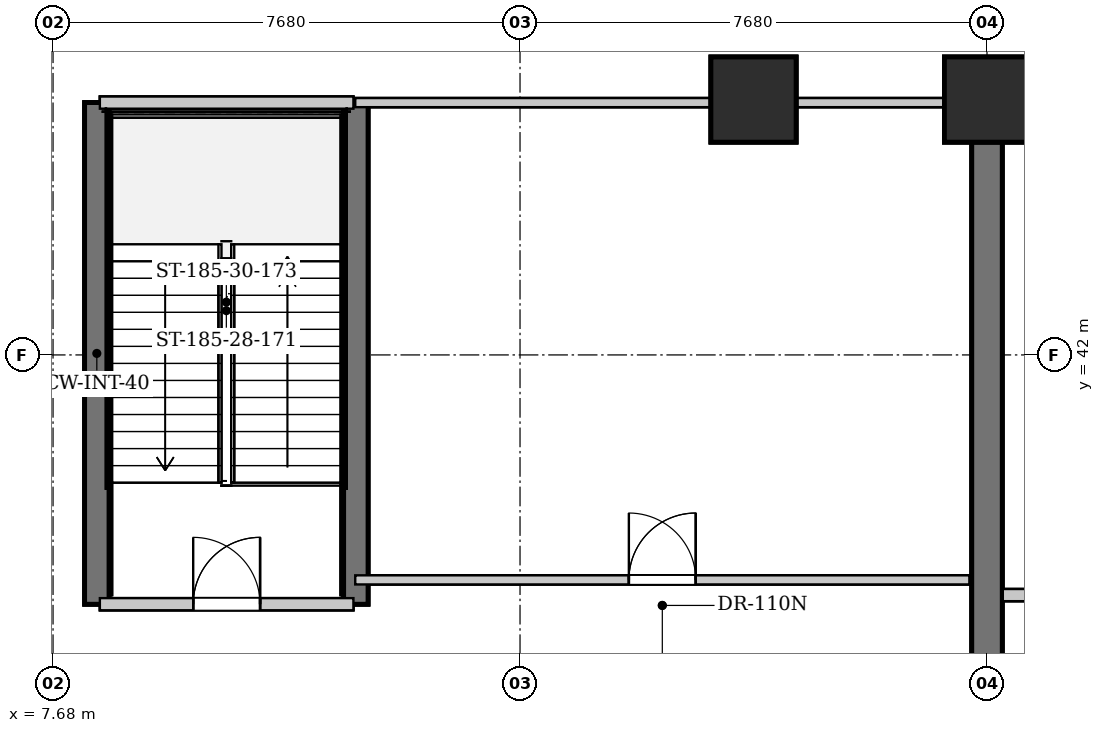
"""IFC4 building model, lengths in metres.
Left out: names, types, materials, properties, quantities, classifications, styles, units other than length and angle.
Written with IfcOpenShell. Run it as: python <this file> out.ifc"""

import sys

from ifc_helpers import new_model, si_unit, direction, frame, frame_2d, origin, origin_2d, place, context, subcontext, project, spatial, rectangle, extrude, element, fill, save


model = new_model("IFC4")
c1 = context("Model", 3, precision=1e-05, world=origin(), true_north=direction((0.0, 1.0)))
c2 = subcontext(c1, "Body", "Model", "MODEL_VIEW")
j1 = project(units=[si_unit("LENGTHUNIT", "METRE"), si_unit("PLANEANGLEUNIT", "RADIAN")], contexts=[c1])
p1 = place(None, origin())
s1 = spatial("IfcSite", under=j1, at=p1, CompositionType="ELEMENT")
p2 = place(p1, origin())
s2 = spatial("IfcBuilding", under=s1, at=p2, CompositionType="ELEMENT")
p3 = place(p2, frame((0.0, 0.0, 10.4)))
s3 = spatial("IfcBuildingStorey", under=s2, at=p3, CompositionType="ELEMENT", Elevation=10.4)
p4 = place(p3, frame((22.79, 46.2, 0.0), z_axis=(0.0, 0.0, 1.0), x_axis=(1.0, 0.0, 0.0)))
e1 = element("IfcWall", 1, at=p4, inside=s3, PredefinedType="SHEAR", context=c2, shape_type="SweptSolid", body=[
    extrude(rectangle(XDim=31.22, YDim=0.5, at=frame_2d((15.61, 0.0))), origin(), (0.0, 0.0, 1.0), 4.94),
])
p5 = place(p3, frame((23.04, 35.65, 0.0), z_axis=(0.0, 0.0, 1.0), x_axis=(0.0, 1.0, 0.0)))
e2 = element("IfcWall", 2, at=p5, inside=s3, PredefinedType="SHEAR", context=c2, shape_type="SweptSolid", body=[
    extrude(rectangle(XDim=10.3, YDim=0.5, at=frame_2d((5.15, 0.0))), origin(), (0.0, 0.0, 1.0), 4.94),
])
for number, where, z_axis, x_axis in (
    (3, (8.4, 37.9, 0.0), (0.0, 0.0, 1.0), (0.0, 1.0, 0.0)),
    (4, (12.66, 37.9, 0.0), (0.0, 0.0, 1.0), (0.0, 1.0, 0.0)),
):
    element("IfcWall", number, at=place(p3, frame(where, z_axis=z_axis, x_axis=x_axis)), inside=s3, PredefinedType="SHEAR", context=c2, shape_type="SweptSolid", body=[
        extrude(rectangle(XDim=8.25, YDim=0.4, at=frame_2d((4.125, 0.0))), origin(), (0.0, 0.0, 1.0), 4.94),
    ])
for number, where, z_axis, x_axis in (
    (5, (23.04, 46.2, 0.0), (0.0, 0.0, 1.0), (1.0, 0.0, 0.0)),
    (6, (19.2, 46.2, 0.0), (0.0, 0.0, 1.0), (1.0, 0.0, 0.0)),
):
    element("IfcColumn", number, at=place(p3, frame(where, z_axis=z_axis, x_axis=x_axis)), inside=s3, PredefinedType="COLUMN", context=c2, shape_type="SweptSolid", body=[
        extrude(rectangle(XDim=1.4, YDim=1.4, at=origin_2d()), origin(), (0.0, 0.0, 1.0), 5.2),
    ])
p6 = place(p3, frame((23.3, 38.05, 0.0), z_axis=(0.0, 0.0, 1.0), x_axis=(1.0, 0.0, 0.0)))
e7 = element("IfcWall", 7, at=p6, inside=s3, PredefinedType="PARTITIONING", context=c2, shape_type="SweptSolid", body=[
    extrude(rectangle(XDim=3.62, YDim=0.2, at=frame_2d((1.81, 0.0))), origin(), (0.0, 0.0, 1.0), 4.94),
])
p7 = place(p6, frame((1.26, 0.0, 0.0)))
e8 = element("IfcOpeningElement", 8, at=p7, cuts=e7, PredefinedType="OPENING", context=c2, shape_type="SweptSolid", body=[
    extrude(rectangle(XDim=1.1, YDim=2.15, at=frame_2d((0.55, 1.075))), frame((0.0, 0.11, 0.0), z_axis=(0.0, -1.0, 0.0), x_axis=(1.0, 0.0, 0.0)), (0.0, 0.0, 1.0), 0.22),
])
p8 = place(p3, frame((8.45, 37.9, 0.0), z_axis=(0.0, 0.0, 1.0), x_axis=(1.0, 0.0, 0.0)))
e9 = element("IfcWall", 9, at=p8, inside=s3, PredefinedType="PARTITIONING", context=c2, shape_type="SweptSolid", body=[
    extrude(rectangle(XDim=4.17, YDim=0.2, at=frame_2d((2.085, 0.0))), origin(), (0.0, 0.0, 1.0), 4.94),
])
p9 = place(p8, frame((1.535, 0.0, 0.0)))
e10 = element("IfcOpeningElement", 10, at=p9, cuts=e9, PredefinedType="OPENING", context=c2, shape_type="SweptSolid", body=[
    extrude(rectangle(XDim=1.1, YDim=2.15, at=frame_2d((0.55, 1.075))), frame((0.0, 0.11, 0.0), z_axis=(0.0, -1.0, 0.0), x_axis=(1.0, 0.0, 0.0)), (0.0, 0.0, 1.0), 0.22),
])
p10 = place(p3, frame((8.45, 46.15, 0.0), z_axis=(0.0, 0.0, 1.0), x_axis=(1.0, 0.0, 0.0)))
e11 = element("IfcWall", 11, at=p10, inside=s3, PredefinedType="PARTITIONING", context=c2, shape_type="SweptSolid", body=[
    extrude(rectangle(XDim=4.17, YDim=0.2, at=frame_2d((2.085, 0.0))), origin(), (0.0, 0.0, 1.0), 4.94),
])
p11 = place(p3, frame((12.65, 38.3, 0.0), z_axis=(0.0, 0.0, 1.0), x_axis=(1.0, 0.0, 0.0)))
e12 = element("IfcWall", 12, at=p11, inside=s3, PredefinedType="PARTITIONING", context=c2, shape_type="SweptSolid", body=[
    extrude(rectangle(XDim=10.1, YDim=0.15, at=frame_2d((5.05, 0.0))), origin(), (0.0, 0.0, 1.0), 4.94),
])
p12 = place(p11, frame((4.5, 0.0, 0.0)))
e13 = element("IfcOpeningElement", 13, at=p12, cuts=e12, PredefinedType="OPENING", context=c2, shape_type="SweptSolid", body=[
    extrude(rectangle(XDim=1.1, YDim=2.15, at=frame_2d((0.55, 1.075))), frame((0.0, 0.085, 0.0), z_axis=(0.0, -1.0, 0.0), x_axis=(1.0, 0.0, 0.0)), (0.0, 0.0, 1.0), 0.17),
])
p13 = place(p3, frame((12.65, 46.15, 0.0), z_axis=(0.0, 0.0, 1.0), x_axis=(1.0, 0.0, 0.0)))
e14 = element("IfcWall", 14, at=p13, inside=s3, PredefinedType="PARTITIONING", context=c2, shape_type="SweptSolid", body=[
    extrude(rectangle(XDim=10.1, YDim=0.15, at=frame_2d((5.05, 0.0))), origin(), (0.0, 0.0, 1.0), 4.94),
])
p14 = place(p9, origin())
e15 = element("IfcDoor", 15, at=p14, inside=s3, OperationType="SINGLE_SWING_RIGHT", PredefinedType="DOOR", context=c2, shape_type="SweptSolid", body=[
    extrude(rectangle(XDim=1.1, YDim=2.15, at=frame_2d((0.55, 1.075))), frame((0.0, 0.025, 0.0), z_axis=(0.0, -1.0, 0.0), x_axis=(1.0, 0.0, 0.0)), (0.0, 0.0, 1.0), 0.05),
])
fill(e10, e15)
p15 = place(p12, origin())
e16 = element("IfcDoor", 16, at=p15, inside=s3, OperationType="SINGLE_SWING_RIGHT", PredefinedType="DOOR", context=c2, shape_type="SweptSolid", body=[
    extrude(rectangle(XDim=1.1, YDim=2.15, at=frame_2d((0.55, 1.075))), frame((0.0, 0.025, 0.0), z_axis=(0.0, -1.0, 0.0), x_axis=(1.0, 0.0, 0.0)), (0.0, 0.0, 1.0), 0.05),
])
fill(e13, e16)
save(model, sys.argv[1])
